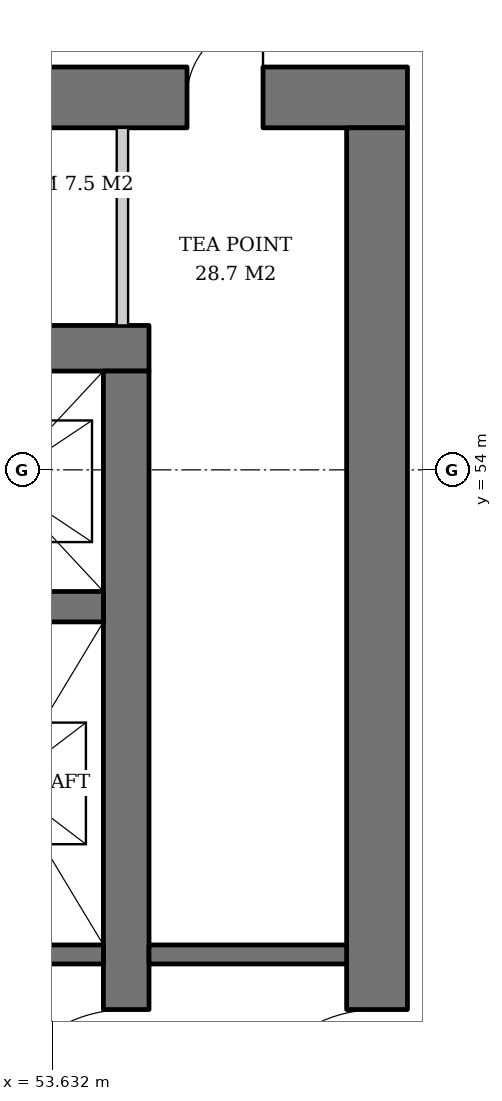
"""IFC4 building model, lengths in metres.
Left out: names, types, materials, properties, quantities, classifications, styles, units other than length and angle.
Written with IfcOpenShell. Run it as: python <this file> out.ifc"""

import sys

from ifc_helpers import new_model, si_unit, direction, frame, frame_2d, origin, place, context, subcontext, project, spatial, rectangle, extrude, element, fill, save


model = new_model("IFC4")
c1 = context("Model", 3, precision=1e-05, world=origin(), true_north=direction((0.0, 1.0)))
c2 = subcontext(c1, "Body", "Model", "MODEL_VIEW")
j1 = project(units=[si_unit("LENGTHUNIT", "METRE"), si_unit("PLANEANGLEUNIT", "RADIAN")], contexts=[c1])
p1 = place(None, origin())
s1 = spatial("IfcSite", under=j1, at=p1, CompositionType="ELEMENT")
p2 = place(p1, origin())
s2 = spatial("IfcBuilding", under=s1, at=p2, CompositionType="ELEMENT")
p3 = place(p2, frame((0.0, 0.0, 43.8)))
s3 = spatial("IfcBuildingStorey", under=s2, at=p3, CompositionType="ELEMENT", Elevation=43.8)
p4 = place(p3, frame((35.1, 55.6, 0.0), z_axis=(0.0, 0.0, 1.0), x_axis=(1.0, 0.0, 0.0)))
e1 = element("IfcWall", 1, at=p4, inside=s3, PredefinedType="SHEAR", context=c2, shape_type="SweptSolid", body=[
    extrude(rectangle(XDim=19.8, YDim=0.6, at=frame_2d((9.9, 0.0))), origin(), (0.0, 0.0, 1.0), 3.8),
])
p5 = place(p4, frame((14.54, 0.0, 0.0)))
e2 = element("IfcOpeningElement", 2, at=p5, cuts=e1, PredefinedType="OPENING", context=c2, shape_type="SweptSolid", body=[
    extrude(rectangle(XDim=1.0, YDim=2.1, at=frame_2d((0.5, 1.05))), frame((0.0, 0.31, 0.0), z_axis=(0.0, -1.0, 0.0), x_axis=(1.0, 0.0, 0.0)), (0.0, 0.0, 1.0), 0.62),
])
p6 = place(p4, frame((2.425, 0.0, 0.0)))
e3 = element("IfcOpeningElement", 3, at=p6, cuts=e1, PredefinedType="OPENING", context=c2, shape_type="SweptSolid", body=[
    extrude(rectangle(XDim=1.0, YDim=2.1, at=frame_2d((0.5, 1.05))), frame((0.0, 0.31, 0.0), z_axis=(0.0, -1.0, 0.0), x_axis=(1.0, 0.0, 0.0)), (0.0, 0.0, 1.0), 0.62),
])
p7 = place(p3, frame((54.6, 36.7, 0.0), z_axis=(0.0, 0.0, 1.0), x_axis=(0.0, 1.0, 0.0)))
e4 = element("IfcWall", 4, at=p7, inside=s3, PredefinedType="SHEAR", context=c2, shape_type="SweptSolid", body=[
    extrude(rectangle(XDim=18.6, YDim=0.6, at=frame_2d((9.3, 0.0))), origin(), (0.0, 0.0, 1.0), 3.8),
])
p8 = place(p7, frame((8.4, 0.0, 0.0)))
e5 = element("IfcOpeningElement", 5, at=p8, cuts=e4, PredefinedType="OPENING", context=c2, shape_type="SweptSolid", body=[
    extrude(rectangle(XDim=1.8, YDim=2.4, at=frame_2d((0.9, 1.2))), frame((0.0, 0.31, 0.0), z_axis=(0.0, -1.0, 0.0), x_axis=(1.0, 0.0, 0.0)), (0.0, 0.0, 1.0), 0.62),
])
p9 = place(p3, frame((31.7, 58.9, 0.0), z_axis=(0.0, 0.0, 1.0), x_axis=(1.0, 0.0, 0.0)))
e6 = element("IfcWall", 6, at=p9, inside=s3, PredefinedType="SHEAR", context=c2, shape_type="SweptSolid", body=[
    extrude(rectangle(XDim=26.6, YDim=0.8, at=frame_2d((13.3, 0.0))), origin(), (0.0, 0.0, 1.0), 3.8),
])
p10 = place(p9, frame((17.94, 0.0, 0.0)))
e7 = element("IfcOpeningElement", 7, at=p10, cuts=e6, PredefinedType="OPENING", context=c2, shape_type="SweptSolid", body=[
    extrude(rectangle(XDim=1.0, YDim=2.1, at=frame_2d((0.5, 1.05))), frame((0.0, 0.41, 0.0), z_axis=(0.0, -1.0, 0.0), x_axis=(1.0, 0.0, 0.0)), (0.0, 0.0, 1.0), 0.82),
])
p11 = place(p9, frame((5.825, 0.0, 0.0)))
e8 = element("IfcOpeningElement", 8, at=p11, cuts=e6, PredefinedType="OPENING", context=c2, shape_type="SweptSolid", body=[
    extrude(rectangle(XDim=1.0, YDim=2.1, at=frame_2d((0.5, 1.05))), frame((0.0, 0.41, 0.0), z_axis=(0.0, -1.0, 0.0), x_axis=(1.0, 0.0, 0.0)), (0.0, 0.0, 1.0), 0.82),
])
p12 = place(p9, frame((1.233, 0.0, 0.0)))
e9 = element("IfcOpeningElement", 9, at=p12, cuts=e6, PredefinedType="OPENING", context=c2, shape_type="SweptSolid", body=[
    extrude(rectangle(XDim=1.0, YDim=2.1, at=frame_2d((0.5, 1.05))), frame((0.0, 0.41, 0.0), z_axis=(0.0, -1.0, 0.0), x_axis=(1.0, 0.0, 0.0)), (0.0, 0.0, 1.0), 0.82),
])
p13 = place(p9, frame((3.479, 0.0, 0.0)))
e10 = element("IfcOpeningElement", 10, at=p13, cuts=e6, PredefinedType="OPENING", context=c2, shape_type="SweptSolid", body=[
    extrude(rectangle(XDim=1.0, YDim=2.1, at=frame_2d((0.5, 1.05))), frame((0.0, 0.41, 0.0), z_axis=(0.0, -1.0, 0.0), x_axis=(1.0, 0.0, 0.0)), (0.0, 0.0, 1.0), 0.82),
])
p14 = place(p9, frame((8.342, 0.0, 0.0)))
e11 = element("IfcOpeningElement", 11, at=p14, cuts=e6, PredefinedType="OPENING", context=c2, shape_type="SweptSolid", body=[
    extrude(rectangle(XDim=1.0, YDim=2.1, at=frame_2d((0.5, 1.05))), frame((0.0, 0.41, 0.0), z_axis=(0.0, -1.0, 0.0), x_axis=(1.0, 0.0, 0.0)), (0.0, 0.0, 1.0), 0.82),
])
p15 = place(p9, frame((11.626, 0.0, 0.0)))
e12 = element("IfcOpeningElement", 12, at=p15, cuts=e6, PredefinedType="OPENING", context=c2, shape_type="SweptSolid", body=[
    extrude(rectangle(XDim=1.0, YDim=2.1, at=frame_2d((0.5, 1.05))), frame((0.0, 0.41, 0.0), z_axis=(0.0, -1.0, 0.0), x_axis=(1.0, 0.0, 0.0)), (0.0, 0.0, 1.0), 0.82),
])
p16 = place(p9, frame((14.862, 0.0, 0.0)))
e13 = element("IfcOpeningElement", 13, at=p16, cuts=e6, PredefinedType="OPENING", context=c2, shape_type="SweptSolid", body=[
    extrude(rectangle(XDim=1.0, YDim=2.1, at=frame_2d((0.5, 1.05))), frame((0.0, 0.41, 0.0), z_axis=(0.0, -1.0, 0.0), x_axis=(1.0, 0.0, 0.0)), (0.0, 0.0, 1.0), 0.82),
])
p17 = place(p9, frame((20.875, 0.0, 0.0)))
e14 = element("IfcOpeningElement", 14, at=p17, cuts=e6, PredefinedType="OPENING", context=c2, shape_type="SweptSolid", body=[
    extrude(rectangle(XDim=1.0, YDim=2.1, at=frame_2d((0.5, 1.05))), frame((0.0, 0.41, 0.0), z_axis=(0.0, -1.0, 0.0), x_axis=(1.0, 0.0, 0.0)), (0.0, 0.0, 1.0), 0.82),
])
p18 = place(p9, frame((23.7, 0.0, 0.0)))
e15 = element("IfcOpeningElement", 15, at=p18, cuts=e6, PredefinedType="OPENING", context=c2, shape_type="SweptSolid", body=[
    extrude(rectangle(XDim=1.0, YDim=2.1, at=frame_2d((0.5, 1.05))), frame((0.0, 0.41, 0.0), z_axis=(0.0, -1.0, 0.0), x_axis=(1.0, 0.0, 0.0)), (0.0, 0.0, 1.0), 0.82),
])
p19 = place(p3, frame((57.9, 33.5, 0.0), z_axis=(0.0, 0.0, 1.0), x_axis=(0.0, 1.0, 0.0)))
e16 = element("IfcWall", 16, at=p19, inside=s3, PredefinedType="SHEAR", context=c2, shape_type="SweptSolid", body=[
    extrude(rectangle(XDim=25.0, YDim=0.8, at=frame_2d((12.5, 0.0))), origin(), (0.0, 0.0, 1.0), 3.8),
])
p20 = place(p19, frame((11.6, 0.0, 0.0)))
e17 = element("IfcOpeningElement", 17, at=p20, cuts=e16, PredefinedType="OPENING", context=c2, shape_type="SweptSolid", body=[
    extrude(rectangle(XDim=1.8, YDim=2.4, at=frame_2d((0.9, 1.2))), frame((0.0, 0.41, 0.0), z_axis=(0.0, -1.0, 0.0), x_axis=(1.0, 0.0, 0.0)), (0.0, 0.0, 1.0), 0.82),
])
p21 = place(p3, frame((35.7, 52.2, 0.0), z_axis=(0.0, 0.0, 1.0), x_axis=(1.0, 0.0, 0.0)))
e18 = element("IfcWall", 18, at=p21, inside=s3, PredefinedType="SHEAR", context=c2, shape_type="SweptSolid", body=[
    extrude(rectangle(XDim=18.6, YDim=0.4, at=frame_2d((9.3, 0.0))), origin(), (0.0, 0.0, 1.0), 3.8),
])
p22 = place(p3, frame((48.93, 47.625, 0.0), z_axis=(0.0, 0.0, 1.0), x_axis=(1.0, 0.0, 0.0)))
e19 = element("IfcWall", 19, at=p22, inside=s3, PredefinedType="SHEAR", context=c2, shape_type="SweptSolid", body=[
    extrude(rectangle(XDim=5.37, YDim=0.25, at=frame_2d((2.685, 0.0))), origin(), (0.0, 0.0, 1.0), 3.8),
])
p23 = place(p3, frame((54.9, 47.625, 0.0), z_axis=(0.0, 0.0, 1.0), x_axis=(1.0, 0.0, 0.0)))
e20 = element("IfcWall", 20, at=p23, inside=s3, PredefinedType="SOLIDWALL", context=c2, shape_type="SweptSolid", body=[
    extrude(rectangle(XDim=2.6, YDim=0.25, at=frame_2d((1.3, 0.0))), origin(), (0.0, 0.0, 1.0), 3.62),
])
p24 = place(p3, frame((54.55, 55.9, 0.0), z_axis=(0.0, 0.0, 1.0), x_axis=(0.0, 1.0, 0.0)))
e21 = element("IfcWall", 21, at=p24, inside=s3, PredefinedType="SOLIDWALL", context=c2, shape_type="SweptSolid", body=[
    extrude(rectangle(XDim=2.6, YDim=0.15, at=frame_2d((1.3, 0.0))), origin(), (0.0, 0.0, 1.0), 3.62),
])
p25 = place(p8, origin())
e22 = element("IfcDoor", 22, at=p25, inside=s3, OperationType="DOUBLE_DOOR_SINGLE_SWING", PredefinedType="DOOR", context=c2, shape_type="SweptSolid", body=[
    extrude(rectangle(XDim=1.8, YDim=2.4, at=frame_2d((0.9, 1.2))), frame((0.0, 0.025, 0.0), z_axis=(0.0, -1.0, 0.0), x_axis=(1.0, 0.0, 0.0)), (0.0, 0.0, 1.0), 0.05),
])
fill(e5, e22)
p26 = place(p20, origin())
e23 = element("IfcDoor", 23, at=p26, inside=s3, OperationType="DOUBLE_DOOR_SINGLE_SWING", PredefinedType="DOOR", context=c2, shape_type="SweptSolid", body=[
    extrude(rectangle(XDim=1.8, YDim=2.4, at=frame_2d((0.9, 1.2))), frame((0.0, 0.025, 0.0), z_axis=(0.0, -1.0, 0.0), x_axis=(1.0, 0.0, 0.0)), (0.0, 0.0, 1.0), 0.05),
])
fill(e17, e23)
p27 = place(p18, origin())
e24 = element("IfcDoor", 24, at=p27, inside=s3, OperationType="SINGLE_SWING_RIGHT", PredefinedType="DOOR", context=c2, shape_type="SweptSolid", body=[
    extrude(rectangle(XDim=1.0, YDim=2.1, at=frame_2d((0.5, 1.05))), frame((0.0, -0.34, 0.0), z_axis=(0.0, -1.0, 0.0), x_axis=(1.0, 0.0, 0.0)), (0.0, 0.0, 1.0), 0.05),
])
fill(e15, e24)
save(model, sys.argv[1])
